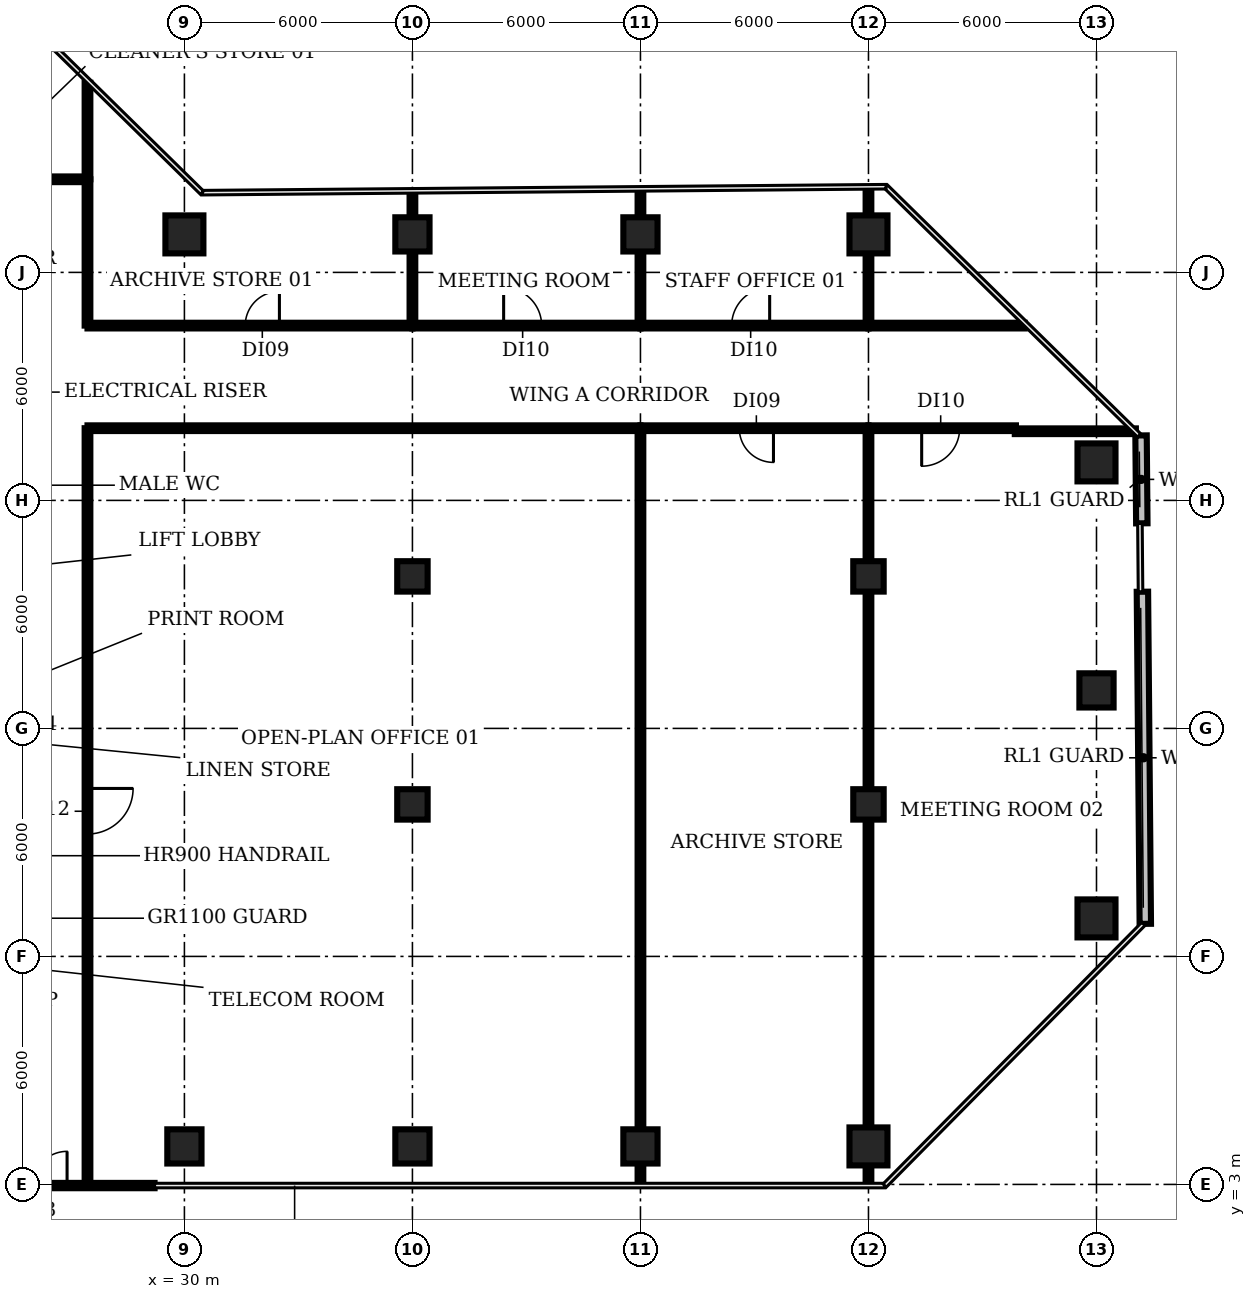
"""IFC4 building model, lengths in metres.
Left out: names, types, materials, properties, quantities, classifications, styles, units other than length and angle.
Written with IfcOpenShell. Run it as: python <this file> out.ifc"""

import sys

from ifc_helpers import new_model, si_unit, direction, frame, frame_2d, origin, origin_2d, place, context, subcontext, project, spatial, rectangle, circle, extrude, element, fill, save


model = new_model("IFC4")
c1 = context("Model", 3, precision=1e-05, world=origin(), true_north=direction((0.0, 1.0)))
c2 = subcontext(c1, "Body", "Model", "MODEL_VIEW")
j1 = project(units=[si_unit("LENGTHUNIT", "METRE"), si_unit("PLANEANGLEUNIT", "RADIAN")], contexts=[c1])
p1 = place(None, origin())
s1 = spatial("IfcSite", under=j1, at=p1, CompositionType="ELEMENT")
p2 = place(p1, origin())
s2 = spatial("IfcBuilding", under=s1, at=p2, CompositionType="ELEMENT")
p3 = place(p2, frame((0.0, 0.0, 108.8)))
s3 = spatial("IfcBuildingStorey", under=s2, at=p3, CompositionType="ELEMENT", Elevation=108.8)
p4 = place(p3, frame((30.0, 4.0, 0.0), z_axis=(0.0, 0.0, 1.0), x_axis=(1.0, 0.0, 0.0)))
e1 = element("IfcColumn", 1, at=p4, inside=s3, PredefinedType="COLUMN", context=c2, shape_type="SweptSolid", body=[
    extrude(rectangle(XDim=0.9, YDim=0.9, at=origin_2d()), origin(), (0.0, 0.0, 1.0), 3.85),
])
p5 = place(p3, frame((30.0, 28.0, 0.0), z_axis=(0.0, 0.0, 1.0), x_axis=(1.0, 0.0, 0.0)))
e2 = element("IfcColumn", 2, at=p5, inside=s3, PredefinedType="COLUMN", context=c2, shape_type="SweptSolid", body=[
    extrude(circle(Radius=0.5, at=origin_2d()), origin(), (0.0, 0.0, 1.0), 3.85),
])
p6 = place(p3, frame((36.0, 4.0, 0.0), z_axis=(0.0, 0.0, 1.0), x_axis=(1.0, 0.0, 0.0)))
e3 = element("IfcColumn", 3, at=p6, inside=s3, PredefinedType="COLUMN", context=c2, shape_type="SweptSolid", body=[
    extrude(rectangle(XDim=0.9, YDim=0.9, at=origin_2d()), origin(), (0.0, 0.0, 1.0), 3.85),
])
for number, where, z_axis, x_axis in (
    (4, (36.0, 13.0, 0.0), (0.0, 0.0, 1.0), (1.0, 0.0, 0.0)),
    (5, (36.0, 19.0, 0.0), (0.0, 0.0, 1.0), (1.0, 0.0, 0.0)),
):
    element("IfcColumn", number, at=place(p3, frame(where, z_axis=z_axis, x_axis=x_axis)), inside=s3, PredefinedType="COLUMN", context=c2, shape_type="SweptSolid", body=[
        extrude(rectangle(XDim=0.8, YDim=0.8, at=origin_2d()), origin(), (0.0, 0.0, 1.0), 3.85),
    ])
for number, where, z_axis, x_axis in (
    (6, (36.0, 28.0, 0.0), (0.0, 0.0, 1.0), (1.0, 0.0, 0.0)),
    (7, (42.0, 4.0, 0.0), (0.0, 0.0, 1.0), (1.0, 0.0, 0.0)),
    (8, (42.0, 28.0, 0.0), (0.0, 0.0, 1.0), (1.0, 0.0, 0.0)),
):
    element("IfcColumn", number, at=place(p3, frame(where, z_axis=z_axis, x_axis=x_axis)), inside=s3, PredefinedType="COLUMN", context=c2, shape_type="SweptSolid", body=[
        extrude(rectangle(XDim=0.9, YDim=0.9, at=origin_2d()), origin(), (0.0, 0.0, 1.0), 3.85),
    ])
p7 = place(p3, frame((48.0, 4.0, 0.0), z_axis=(0.0, 0.0, 1.0), x_axis=(1.0, 0.0, 0.0)))
e9 = element("IfcColumn", 9, at=p7, inside=s3, PredefinedType="COLUMN", context=c2, shape_type="SweptSolid", body=[
    extrude(circle(Radius=0.5, at=origin_2d()), origin(), (0.0, 0.0, 1.0), 3.85),
])
for number, where, z_axis, x_axis in (
    (10, (48.0, 13.0, 0.0), (0.0, 0.0, 1.0), (1.0, 0.0, 0.0)),
    (11, (48.0, 19.0, 0.0), (0.0, 0.0, 1.0), (1.0, 0.0, 0.0)),
):
    element("IfcColumn", number, at=place(p3, frame(where, z_axis=z_axis, x_axis=x_axis)), inside=s3, PredefinedType="COLUMN", context=c2, shape_type="SweptSolid", body=[
        extrude(rectangle(XDim=0.8, YDim=0.8, at=origin_2d()), origin(), (0.0, 0.0, 1.0), 3.85),
    ])
for number, where, z_axis, x_axis in (
    (12, (48.0, 28.0, 0.0), (0.0, 0.0, 1.0), (1.0, 0.0, 0.0)),
    (13, (54.0, 10.0, 0.0), (0.0, 0.0, 1.0), (1.0, 0.0, 0.0)),
):
    element("IfcColumn", number, at=place(p3, frame(where, z_axis=z_axis, x_axis=x_axis)), inside=s3, PredefinedType="COLUMN", context=c2, shape_type="SweptSolid", body=[
        extrude(circle(Radius=0.5, at=origin_2d()), origin(), (0.0, 0.0, 1.0), 3.85),
    ])
p8 = place(p3, frame((54.0, 16.0, 0.0), z_axis=(0.0, 0.0, 1.0), x_axis=(1.0, 0.0, 0.0)))
e14 = element("IfcColumn", 14, at=p8, inside=s3, PredefinedType="COLUMN", context=c2, shape_type="SweptSolid", body=[
    extrude(rectangle(XDim=0.9, YDim=0.9, at=origin_2d()), origin(), (0.0, 0.0, 1.0), 3.85),
])
p9 = place(p3, frame((54.0, 22.0, 0.0), z_axis=(0.0, 0.0, 1.0), x_axis=(1.0, 0.0, 0.0)))
e15 = element("IfcColumn", 15, at=p9, inside=s3, PredefinedType="COLUMN", context=c2, shape_type="SweptSolid", body=[
    extrude(circle(Radius=0.5, at=origin_2d()), origin(), (0.0, 0.0, 1.0), 3.85),
])
p10 = place(p3, frame((22.811, 2.97, 0.0), z_axis=(0.0, 0.0, 1.0), x_axis=(1.0, 0.0, 0.0)))
e16 = element("IfcWall", 16, at=p10, inside=s3, PredefinedType="SOLIDWALL", context=c2, shape_type="SweptSolid", body=[
    extrude(rectangle(XDim=6.404, YDim=0.14, at=frame_2d((3.202, 0.0))), origin(), (0.0, 0.0, 1.0), 3.85),
])
p11 = place(p10, frame((2.302, 0.0, 0.0)))
e17 = element("IfcOpeningElement", 17, at=p11, cuts=e16, PredefinedType="OPENING", context=c2, shape_type="SweptSolid", body=[
    extrude(rectangle(XDim=1.8, YDim=2.4, at=frame_2d((0.9, 1.2))), frame((0.0, 0.08, 0.0), z_axis=(0.0, -1.0, 0.0), x_axis=(1.0, 0.0, 0.0)), (0.0, 0.0, 1.0), 0.16),
])
p12 = place(p3, frame((55.284, 9.857, 0.0), z_axis=(0.0, 0.0, 1.0), x_axis=(-0.008715239699, 0.999962021577, 0.0)))
e18 = element("IfcWall", 18, at=p12, inside=s3, PredefinedType="SOLIDWALL", context=c2, shape_type="SweptSolid", body=[
    extrude(rectangle(XDim=8.74, YDim=0.3, at=frame_2d((4.37, 0.0))), origin(), (0.0, 0.0, 1.0), 3.85),
])
p13 = place(p3, frame((55.192, 20.396, 0.0), z_axis=(0.0, 0.0, 1.0), x_axis=(-0.008654029484, 0.999962553186, 0.0)))
e19 = element("IfcWall", 19, at=p13, inside=s3, PredefinedType="SOLIDWALL", context=c2, shape_type="SweptSolid", body=[
    extrude(rectangle(XDim=2.313, YDim=0.3, at=frame_2d((1.157, 0.0))), origin(), (0.0, 0.0, 1.0), 3.85),
])
p14 = place(p3, frame((23.85, 29.45, 0.0), z_axis=(0.0, 0.0, 1.0), x_axis=(1.0, 0.0, 0.0)))
e20 = element("IfcWall", 20, at=p14, inside=s3, PredefinedType="PARTITIONING", context=c2, shape_type="SweptSolid", body=[
    extrude(rectangle(XDim=3.6, YDim=0.15, at=frame_2d((1.8, 0.0))), origin(), (0.0, 0.0, 1.0), 2.83),
])
p15 = place(p14, frame((1.3, 0.0, 0.0)))
e21 = element("IfcOpeningElement", 21, at=p15, cuts=e20, PredefinedType="OPENING", context=c2, shape_type="SweptSolid", body=[
    extrude(rectangle(XDim=0.9, YDim=2.1, at=frame_2d((0.45, 1.05))), frame((0.0, 0.085, 0.0), z_axis=(0.0, -1.0, 0.0), x_axis=(1.0, 0.0, 0.0)), (0.0, 0.0, 1.0), 0.17),
])
p16 = place(p3, frame((27.45, 22.9, 0.0), z_axis=(0.0, 0.0, 1.0), x_axis=(0.0, -1.0, 0.0)))
e22 = element("IfcWall", 22, at=p16, inside=s3, PredefinedType="PARTITIONING", context=c2, shape_type="SweptSolid", body=[
    extrude(rectangle(XDim=19.88, YDim=0.15, at=frame_2d((9.94, 0.0))), origin(), (0.0, 0.0, 1.0), 2.83),
])
p17 = place(p16, frame((9.48, 0.0, 0.0)))
e23 = element("IfcOpeningElement", 23, at=p17, cuts=e22, PredefinedType="OPENING", context=c2, shape_type="SweptSolid", body=[
    extrude(rectangle(XDim=1.2, YDim=2.1, at=frame_2d((0.6, 1.05))), frame((0.0, 0.085, 0.0), z_axis=(0.0, -1.0, 0.0), x_axis=(1.0, 0.0, 0.0)), (0.0, 0.0, 1.0), 0.17),
])
p18 = place(p3, frame((27.45, 22.9, 0.0), z_axis=(0.0, 0.0, 1.0), x_axis=(1.0, 0.0, 0.0)))
e24 = element("IfcWall", 24, at=p18, inside=s3, PredefinedType="PARTITIONING", context=c2, shape_type="SweptSolid", body=[
    extrude(rectangle(XDim=14.55, YDim=0.15, at=frame_2d((7.275, 0.0))), origin(), (0.0, 0.0, 1.0), 2.83),
])
p19 = place(p3, frame((27.45, 25.6, 0.0), z_axis=(0.0, 0.0, 1.0), x_axis=(0.0, 1.0, 0.0)))
e25 = element("IfcWall", 25, at=p19, inside=s3, PredefinedType="PARTITIONING", context=c2, shape_type="SweptSolid", body=[
    extrude(rectangle(XDim=3.85, YDim=0.15, at=frame_2d((1.925, 0.0))), origin(), (0.0, 0.0, 1.0), 2.83),
])
p20 = place(p3, frame((27.45, 25.6, 0.0), z_axis=(0.0, 0.0, 1.0), x_axis=(1.0, 0.0, 0.0)))
e26 = element("IfcWall", 26, at=p20, inside=s3, PredefinedType="PARTITIONING", context=c2, shape_type="SweptSolid", body=[
    extrude(rectangle(XDim=8.55, YDim=0.15, at=frame_2d((4.275, 0.0))), origin(), (0.0, 0.0, 1.0), 2.83),
])
p21 = place(p20, frame((4.15, 0.0, 0.0)))
e27 = element("IfcOpeningElement", 27, at=p21, cuts=e26, PredefinedType="OPENING", context=c2, shape_type="SweptSolid", body=[
    extrude(rectangle(XDim=0.9, YDim=2.1, at=frame_2d((0.45, 1.05))), frame((0.0, 0.085, 0.0), z_axis=(0.0, -1.0, 0.0), x_axis=(1.0, 0.0, 0.0)), (0.0, 0.0, 1.0), 0.17),
])
p22 = place(p3, frame((27.45, 29.45, 0.0), z_axis=(0.0, 0.0, 1.0), x_axis=(0.0, 1.0, 0.0)))
e28 = element("IfcWall", 28, at=p22, inside=s3, PredefinedType="PARTITIONING", context=c2, shape_type="SweptSolid", body=[
    extrude(rectangle(XDim=2.54, YDim=0.15, at=frame_2d((1.27, 0.0))), origin(), (0.0, 0.0, 1.0), 2.83),
])
p23 = place(p3, frame((36.0, 25.6, 0.0), z_axis=(0.0, 0.0, 1.0), x_axis=(0.0, 1.0, 0.0)))
e29 = element("IfcWall", 29, at=p23, inside=s3, PredefinedType="PARTITIONING", context=c2, shape_type="SweptSolid", body=[
    extrude(rectangle(XDim=3.5, YDim=0.15, at=frame_2d((1.75, 0.0))), origin(), (0.0, 0.0, 1.0), 2.83),
])
p24 = place(p3, frame((36.0, 25.6, 0.0), z_axis=(0.0, 0.0, 1.0), x_axis=(1.0, 0.0, 0.0)))
e30 = element("IfcWall", 30, at=p24, inside=s3, PredefinedType="PARTITIONING", context=c2, shape_type="SweptSolid", body=[
    extrude(rectangle(XDim=6.0, YDim=0.15, at=frame_2d((3.0, 0.0))), origin(), (0.0, 0.0, 1.0), 2.83),
])
p25 = place(p24, frame((2.4, 0.0, 0.0)))
e31 = element("IfcOpeningElement", 31, at=p25, cuts=e30, PredefinedType="OPENING", context=c2, shape_type="SweptSolid", body=[
    extrude(rectangle(XDim=1.0, YDim=2.1, at=frame_2d((0.5, 1.05))), frame((0.0, 0.085, 0.0), z_axis=(0.0, -1.0, 0.0), x_axis=(1.0, 0.0, 0.0)), (0.0, 0.0, 1.0), 0.17),
])
p26 = place(p3, frame((42.0, 3.035, 0.0), z_axis=(0.0, 0.0, 1.0), x_axis=(0.0, 1.0, 0.0)))
e32 = element("IfcWall", 32, at=p26, inside=s3, PredefinedType="PARTITIONING", context=c2, shape_type="SweptSolid", body=[
    extrude(rectangle(XDim=19.865, YDim=0.15, at=frame_2d((9.933, 0.0))), origin(), (0.0, 0.0, 1.0), 2.83),
])
p27 = place(p3, frame((42.0, 25.6, 0.0), z_axis=(0.0, 0.0, 1.0), x_axis=(0.0, 1.0, 0.0)))
e33 = element("IfcWall", 33, at=p27, inside=s3, PredefinedType="PARTITIONING", context=c2, shape_type="SweptSolid", body=[
    extrude(rectangle(XDim=3.55, YDim=0.15, at=frame_2d((1.775, 0.0))), origin(), (0.0, 0.0, 1.0), 2.83),
])
p28 = place(p3, frame((42.0, 25.6, 0.0), z_axis=(0.0, 0.0, 1.0), x_axis=(1.0, 0.0, 0.0)))
e34 = element("IfcWall", 34, at=p28, inside=s3, PredefinedType="PARTITIONING", context=c2, shape_type="SweptSolid", body=[
    extrude(rectangle(XDim=6.0, YDim=0.15, at=frame_2d((3.0, 0.0))), origin(), (0.0, 0.0, 1.0), 2.83),
])
p29 = place(p28, frame((2.4, 0.0, 0.0)))
e35 = element("IfcOpeningElement", 35, at=p29, cuts=e34, PredefinedType="OPENING", context=c2, shape_type="SweptSolid", body=[
    extrude(rectangle(XDim=1.0, YDim=2.1, at=frame_2d((0.5, 1.05))), frame((0.0, 0.085, 0.0), z_axis=(0.0, -1.0, 0.0), x_axis=(1.0, 0.0, 0.0)), (0.0, 0.0, 1.0), 0.17),
])
p30 = place(p3, frame((48.0, 3.02, 0.0), z_axis=(0.0, 0.0, 1.0), x_axis=(0.0, 1.0, 0.0)))
e36 = element("IfcWall", 36, at=p30, inside=s3, PredefinedType="PARTITIONING", context=c2, shape_type="SweptSolid", body=[
    extrude(rectangle(XDim=19.88, YDim=0.15, at=frame_2d((9.94, 0.0))), origin(), (0.0, 0.0, 1.0), 2.83),
])
p31 = place(p3, frame((48.0, 22.9, 0.0), z_axis=(0.0, 0.0, 1.0), x_axis=(-1.0, 0.0, 0.0)))
e37 = element("IfcWall", 37, at=p31, inside=s3, PredefinedType="PARTITIONING", context=c2, shape_type="SweptSolid", body=[
    extrude(rectangle(XDim=6.0, YDim=0.15, at=frame_2d((3.0, 0.0))), origin(), (0.0, 0.0, 1.0), 2.83),
])
p32 = place(p31, frame((2.5, 0.0, 0.0)))
e38 = element("IfcOpeningElement", 38, at=p32, cuts=e37, PredefinedType="OPENING", context=c2, shape_type="SweptSolid", body=[
    extrude(rectangle(XDim=0.9, YDim=2.1, at=frame_2d((0.45, 1.05))), frame((0.0, 0.085, 0.0), z_axis=(0.0, -1.0, 0.0), x_axis=(1.0, 0.0, 0.0)), (0.0, 0.0, 1.0), 0.17),
])
p33 = place(p3, frame((48.0, 25.6, 0.0), z_axis=(0.0, 0.0, 1.0), x_axis=(0.0, 1.0, 0.0)))
e39 = element("IfcWall", 39, at=p33, inside=s3, PredefinedType="PARTITIONING", context=c2, shape_type="SweptSolid", body=[
    extrude(rectangle(XDim=3.6, YDim=0.15, at=frame_2d((1.8, 0.0))), origin(), (0.0, 0.0, 1.0), 2.83),
])
p34 = place(p3, frame((48.0, 25.6, 0.0), z_axis=(0.0, 0.0, 1.0), x_axis=(1.0, 0.0, 0.0)))
e40 = element("IfcWall", 40, at=p34, inside=s3, PredefinedType="PARTITIONING", context=c2, shape_type="SweptSolid", body=[
    extrude(rectangle(XDim=4.11, YDim=0.15, at=frame_2d((2.055, 0.0))), origin(), (0.0, 0.0, 1.0), 2.83),
])
p35 = place(p3, frame((51.85, 22.82, 0.0), z_axis=(0.0, 0.0, 1.0), x_axis=(1.0, 0.0, 0.0)))
e41 = element("IfcWall", 41, at=p35, inside=s3, PredefinedType="PARTITIONING", context=c2, shape_type="SweptSolid", body=[
    extrude(rectangle(XDim=3.186, YDim=0.15, at=frame_2d((1.593, 0.0))), origin(), (0.0, 0.0, 1.0), 2.83),
])
p36 = place(p3, frame((51.88, 22.9, 0.0), z_axis=(0.0, 0.0, 1.0), x_axis=(-1.0, 0.0, 0.0)))
e42 = element("IfcWall", 42, at=p36, inside=s3, PredefinedType="PARTITIONING", context=c2, shape_type="SweptSolid", body=[
    extrude(rectangle(XDim=3.88, YDim=0.15, at=frame_2d((1.94, 0.0))), origin(), (0.0, 0.0, 1.0), 2.83),
])
p37 = place(p36, frame((1.48, 0.0, 0.0)))
e43 = element("IfcOpeningElement", 43, at=p37, cuts=e42, PredefinedType="OPENING", context=c2, shape_type="SweptSolid", body=[
    extrude(rectangle(XDim=1.0, YDim=2.1, at=frame_2d((0.5, 1.05))), frame((0.0, 0.085, 0.0), z_axis=(0.0, -1.0, 0.0), x_axis=(1.0, 0.0, 0.0)), (0.0, 0.0, 1.0), 0.17),
])
p38 = place(p11, origin())
e44 = element("IfcDoor", 44, at=p38, inside=s3, OperationType="DOUBLE_DOOR_DOUBLE_SWING", PredefinedType="DOOR", context=c2, shape_type="SweptSolid", body=[
    extrude(rectangle(XDim=1.8, YDim=2.4, at=frame_2d((0.9, 1.2))), frame((0.0, 0.025, 0.0), z_axis=(0.0, -1.0, 0.0), x_axis=(1.0, 0.0, 0.0)), (0.0, 0.0, 1.0), 0.05),
])
fill(e17, e44)
p39 = place(p17, origin())
e45 = element("IfcDoor", 45, at=p39, inside=s3, OperationType="SINGLE_SWING_LEFT", PredefinedType="DOOR", context=c2, shape_type="SweptSolid", body=[
    extrude(rectangle(XDim=1.2, YDim=2.1, at=frame_2d((0.6, 1.05))), frame((0.0, 0.025, 0.0), z_axis=(0.0, -1.0, 0.0), x_axis=(1.0, 0.0, 0.0)), (0.0, 0.0, 1.0), 0.05),
])
fill(e23, e45)
p40 = place(p21, origin())
e46 = element("IfcDoor", 46, at=p40, inside=s3, OperationType="SINGLE_SWING_RIGHT", PredefinedType="DOOR", context=c2, shape_type="SweptSolid", body=[
    extrude(rectangle(XDim=0.9, YDim=2.1, at=frame_2d((0.45, 1.05))), frame((0.0, 0.025, 0.0), z_axis=(0.0, -1.0, 0.0), x_axis=(1.0, 0.0, 0.0)), (0.0, 0.0, 1.0), 0.05),
])
fill(e27, e46)
p41 = place(p25, origin())
e47 = element("IfcDoor", 47, at=p41, inside=s3, OperationType="SINGLE_SWING_LEFT", PredefinedType="DOOR", context=c2, shape_type="SweptSolid", body=[
    extrude(rectangle(XDim=1.0, YDim=2.1, at=frame_2d((0.5, 1.05))), frame((0.0, 0.025, 0.0), z_axis=(0.0, -1.0, 0.0), x_axis=(1.0, 0.0, 0.0)), (0.0, 0.0, 1.0), 0.05),
])
fill(e31, e47)
p42 = place(p29, origin())
e48 = element("IfcDoor", 48, at=p42, inside=s3, OperationType="SINGLE_SWING_RIGHT", PredefinedType="DOOR", context=c2, shape_type="SweptSolid", body=[
    extrude(rectangle(XDim=1.0, YDim=2.1, at=frame_2d((0.5, 1.05))), frame((0.0, 0.025, 0.0), z_axis=(0.0, -1.0, 0.0), x_axis=(1.0, 0.0, 0.0)), (0.0, 0.0, 1.0), 0.05),
])
fill(e35, e48)
p43 = place(p32, origin())
e49 = element("IfcDoor", 49, at=p43, inside=s3, OperationType="SINGLE_SWING_LEFT", PredefinedType="DOOR", context=c2, shape_type="SweptSolid", body=[
    extrude(rectangle(XDim=0.9, YDim=2.1, at=frame_2d((0.45, 1.05))), frame((0.0, 0.025, 0.0), z_axis=(0.0, -1.0, 0.0), x_axis=(1.0, 0.0, 0.0)), (0.0, 0.0, 1.0), 0.05),
])
fill(e38, e49)
p44 = place(p37, origin())
e50 = element("IfcDoor", 50, at=p44, inside=s3, OperationType="SINGLE_SWING_RIGHT", PredefinedType="DOOR", context=c2, shape_type="SweptSolid", body=[
    extrude(rectangle(XDim=1.0, YDim=2.1, at=frame_2d((0.5, 1.05))), frame((0.0, 0.025, 0.0), z_axis=(0.0, -1.0, 0.0), x_axis=(1.0, 0.0, 0.0)), (0.0, 0.0, 1.0), 0.05),
])
fill(e43, e50)
save(model, sys.argv[1])
